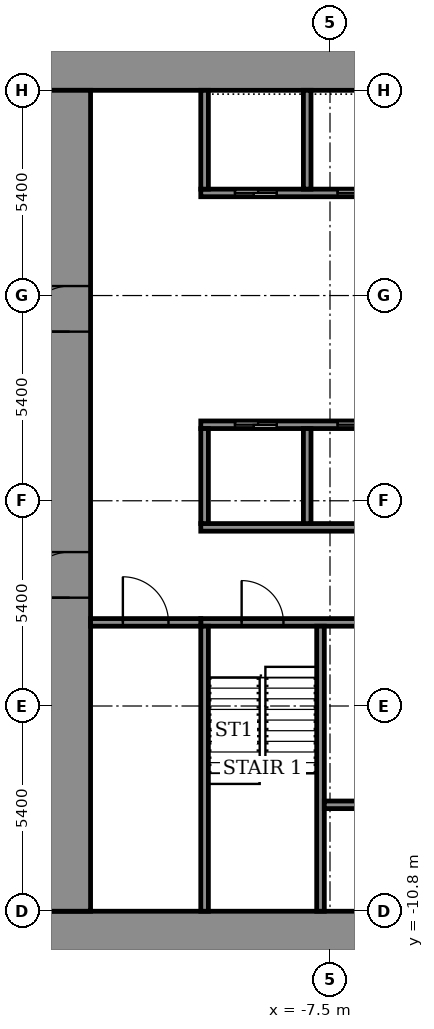
"""IFC4 building model, lengths in metres.
Left out: names, types, materials, properties, quantities, classifications, styles, units other than length and angle.
Written with IfcOpenShell. Run it as: python <this file> out.ifc"""

import sys

from ifc_helpers import new_model, si_unit, direction, frame, frame_2d, origin, place, context, subcontext, project, spatial, rectangle, extrude, element, fill, save


model = new_model("IFC4")
c1 = context("Model", 3, precision=1e-05, world=origin(), true_north=direction((0.0, 1.0)))
c2 = subcontext(c1, "Body", "Model", "MODEL_VIEW")
j1 = project(units=[si_unit("LENGTHUNIT", "METRE"), si_unit("PLANEANGLEUNIT", "RADIAN")], contexts=[c1])
p1 = place(None, origin())
s1 = spatial("IfcSite", under=j1, at=p1, CompositionType="ELEMENT")
p2 = place(p1, origin())
s2 = spatial("IfcBuilding", under=s1, at=p2, CompositionType="ELEMENT")
p3 = place(p2, frame((0.0, 0.0, 41.3)))
s3 = spatial("IfcBuildingStorey", under=s2, at=p3, CompositionType="ELEMENT", Elevation=41.3)
for number, where, z_axis, x_axis in (
    (1, (-14.9, -11.35, 0.0), (0.0, 0.0, 1.0), (1.0, 0.0, 0.0)),
    (2, (-14.9, 11.35, 0.0), (0.0, 0.0, 1.0), (1.0, 0.0, 0.0)),
):
    element("IfcWall", number, at=place(p3, frame(where, z_axis=z_axis, x_axis=x_axis)), inside=s3, PredefinedType="SHEAR", context=c2, shape_type="SweptSolid", body=[
        extrude(rectangle(XDim=29.8, YDim=1.1, at=frame_2d((14.9, 0.0))), origin(), (0.0, 0.0, 1.0), 3.6),
    ])
p4 = place(p3, frame((-14.35, -10.8, 0.0), z_axis=(0.0, 0.0, 1.0), x_axis=(0.0, 1.0, 0.0)))
e3 = element("IfcWall", 3, at=p4, inside=s3, PredefinedType="SHEAR", context=c2, shape_type="SweptSolid", body=[
    extrude(rectangle(XDim=21.6, YDim=1.1, at=frame_2d((10.8, 0.0))), origin(), (0.0, 0.0, 1.0), 3.6),
])
p5 = place(p4, frame((8.25, 0.0, 0.0)))
e4 = element("IfcOpeningElement", 4, at=p5, cuts=e3, PredefinedType="OPENING", context=c2, shape_type="SweptSolid", body=[
    extrude(rectangle(XDim=1.2, YDim=2.1, at=frame_2d((0.6, 1.05))), frame((0.0, 0.56, 0.0), z_axis=(0.0, -1.0, 0.0), x_axis=(1.0, 0.0, 0.0)), (0.0, 0.0, 1.0), 1.12),
])
p6 = place(p4, frame((15.25, 0.0, 0.0)))
e5 = element("IfcOpeningElement", 5, at=p6, cuts=e3, PredefinedType="OPENING", context=c2, shape_type="SweptSolid", body=[
    extrude(rectangle(XDim=1.2, YDim=2.1, at=frame_2d((0.6, 1.05))), frame((0.0, 0.56, 0.0), z_axis=(0.0, -1.0, 0.0), x_axis=(1.0, 0.0, 0.0)), (0.0, 0.0, 1.0), 1.12),
])
p7 = place(p3, frame((-10.9, -3.2, 0.0), z_axis=(0.0, 0.0, 1.0), x_axis=(1.0, 0.0, 0.0)))
e6 = element("IfcWall", 6, at=p7, inside=s3, PredefinedType="SHEAR", context=c2, shape_type="SweptSolid", body=[
    extrude(rectangle(XDim=21.8, YDim=0.2, at=frame_2d((10.9, 0.0))), origin(), (0.0, 0.0, 1.0), 3.05),
])
p8 = place(p7, frame((1.075, 0.0, 0.0)))
e7 = element("IfcOpeningElement", 7, at=p8, cuts=e6, PredefinedType="OPENING", context=c2, shape_type="SweptSolid", body=[
    extrude(rectangle(XDim=1.1, YDim=2.1, at=frame_2d((0.55, 1.05))), frame((0.0, 0.11, 0.0), z_axis=(0.0, -1.0, 0.0), x_axis=(1.0, 0.0, 0.0)), (0.0, 0.0, 1.0), 0.22),
])
p9 = place(p7, frame((10.325, 0.0, 0.0)))
e8 = element("IfcOpeningElement", 8, at=p9, cuts=e6, PredefinedType="OPENING", context=c2, shape_type="SweptSolid", body=[
    extrude(rectangle(XDim=1.1, YDim=2.1, at=frame_2d((0.55, 1.05))), frame((0.0, 0.11, 0.0), z_axis=(0.0, -1.0, 0.0), x_axis=(1.0, 0.0, 0.0)), (0.0, 0.0, 1.0), 0.22),
])
p10 = place(p7, frame((19.625, 0.0, 0.0)))
e9 = element("IfcOpeningElement", 9, at=p10, cuts=e6, PredefinedType="OPENING", context=c2, shape_type="SweptSolid", body=[
    extrude(rectangle(XDim=1.1, YDim=2.1, at=frame_2d((0.55, 1.05))), frame((0.0, 0.11, 0.0), z_axis=(0.0, -1.0, 0.0), x_axis=(1.0, 0.0, 0.0)), (0.0, 0.0, 1.0), 0.22),
])
p11 = place(p7, frame((5.7, 0.0, 0.0)))
e10 = element("IfcOpeningElement", 10, at=p11, cuts=e6, PredefinedType="OPENING", context=c2, shape_type="SweptSolid", body=[
    extrude(rectangle(XDim=1.1, YDim=2.1, at=frame_2d((0.55, 1.05))), frame((0.0, 0.11, 0.0), z_axis=(0.0, -1.0, 0.0), x_axis=(1.0, 0.0, 0.0)), (0.0, 0.0, 1.0), 0.22),
])
p12 = place(p7, frame((14.975, 0.0, 0.0)))
e11 = element("IfcOpeningElement", 11, at=p12, cuts=e6, PredefinedType="OPENING", context=c2, shape_type="SweptSolid", body=[
    extrude(rectangle(XDim=1.1, YDim=2.1, at=frame_2d((0.55, 1.05))), frame((0.0, 0.11, 0.0), z_axis=(0.0, -1.0, 0.0), x_axis=(1.0, 0.0, 0.0)), (0.0, 0.0, 1.0), 0.22),
])
p13 = place(p3, frame((-10.9, -0.7, 0.0), z_axis=(0.0, 0.0, 1.0), x_axis=(1.0, 0.0, 0.0)))
e12 = element("IfcWall", 12, at=p13, inside=s3, PredefinedType="SHEAR", context=c2, shape_type="SweptSolid", body=[
    extrude(rectangle(XDim=21.8, YDim=0.2, at=frame_2d((10.9, 0.0))), origin(), (0.0, 0.0, 1.0), 3.05),
])
p14 = place(p3, frame((-10.9, 2.0, 0.0), z_axis=(0.0, 0.0, 1.0), x_axis=(1.0, 0.0, 0.0)))
e13 = element("IfcWall", 13, at=p14, inside=s3, PredefinedType="SHEAR", context=c2, shape_type="SweptSolid", body=[
    extrude(rectangle(XDim=21.8, YDim=0.2, at=frame_2d((10.9, 0.0))), origin(), (0.0, 0.0, 1.0), 3.05),
])
p15 = place(p14, frame((0.9, 0.0, 0.0)))
e14 = element("IfcOpeningElement", 14, at=p15, cuts=e13, PredefinedType="OPENING", context=c2, shape_type="SweptSolid", body=[
    extrude(rectangle(XDim=1.1, YDim=2.1, at=frame_2d((0.55, 1.05))), frame((0.0, 0.11, 0.0), z_axis=(0.0, -1.0, 0.0), x_axis=(1.0, 0.0, 0.0)), (0.0, 0.0, 1.0), 0.22),
])
p16 = place(p14, frame((3.6, 0.0, 0.0)))
e15 = element("IfcOpeningElement", 15, at=p16, cuts=e13, PredefinedType="OPENING", context=c2, shape_type="SweptSolid", body=[
    extrude(rectangle(XDim=1.1, YDim=2.1, at=frame_2d((0.55, 1.05))), frame((0.0, 0.11, 0.0), z_axis=(0.0, -1.0, 0.0), x_axis=(1.0, 0.0, 0.0)), (0.0, 0.0, 1.0), 0.22),
])
p17 = place(p14, frame((6.3, 0.0, 0.0)))
e16 = element("IfcOpeningElement", 16, at=p17, cuts=e13, PredefinedType="OPENING", context=c2, shape_type="SweptSolid", body=[
    extrude(rectangle(XDim=1.1, YDim=2.1, at=frame_2d((0.55, 1.05))), frame((0.0, 0.11, 0.0), z_axis=(0.0, -1.0, 0.0), x_axis=(1.0, 0.0, 0.0)), (0.0, 0.0, 1.0), 0.22),
])
p18 = place(p14, frame((9.0, 0.0, 0.0)))
e17 = element("IfcOpeningElement", 17, at=p18, cuts=e13, PredefinedType="OPENING", context=c2, shape_type="SweptSolid", body=[
    extrude(rectangle(XDim=1.1, YDim=2.1, at=frame_2d((0.55, 1.05))), frame((0.0, 0.11, 0.0), z_axis=(0.0, -1.0, 0.0), x_axis=(1.0, 0.0, 0.0)), (0.0, 0.0, 1.0), 0.22),
])
p19 = place(p14, frame((11.7, 0.0, 0.0)))
e18 = element("IfcOpeningElement", 18, at=p19, cuts=e13, PredefinedType="OPENING", context=c2, shape_type="SweptSolid", body=[
    extrude(rectangle(XDim=1.1, YDim=2.1, at=frame_2d((0.55, 1.05))), frame((0.0, 0.11, 0.0), z_axis=(0.0, -1.0, 0.0), x_axis=(1.0, 0.0, 0.0)), (0.0, 0.0, 1.0), 0.22),
])
p20 = place(p14, frame((15.85, 0.0, 0.0)))
e19 = element("IfcOpeningElement", 19, at=p20, cuts=e13, PredefinedType="OPENING", context=c2, shape_type="SweptSolid", body=[
    extrude(rectangle(XDim=0.9, YDim=2.1, at=frame_2d((0.45, 1.05))), frame((0.0, 0.11, 0.0), z_axis=(0.0, -1.0, 0.0), x_axis=(1.0, 0.0, 0.0)), (0.0, 0.0, 1.0), 0.22),
])
p21 = place(p14, frame((19.9, 0.0, 0.0)))
e20 = element("IfcOpeningElement", 20, at=p21, cuts=e13, PredefinedType="OPENING", context=c2, shape_type="SweptSolid", body=[
    extrude(rectangle(XDim=0.9, YDim=2.1, at=frame_2d((0.45, 1.05))), frame((0.0, 0.11, 0.0), z_axis=(0.0, -1.0, 0.0), x_axis=(1.0, 0.0, 0.0)), (0.0, 0.0, 1.0), 0.22),
])
p22 = place(p3, frame((-10.9, 8.1, 0.0), z_axis=(0.0, 0.0, 1.0), x_axis=(1.0, 0.0, 0.0)))
e21 = element("IfcWall", 21, at=p22, inside=s3, PredefinedType="SHEAR", context=c2, shape_type="SweptSolid", body=[
    extrude(rectangle(XDim=21.8, YDim=0.2, at=frame_2d((10.9, 0.0))), origin(), (0.0, 0.0, 1.0), 3.05),
])
p23 = place(p22, frame((0.9, 0.0, 0.0)))
e22 = element("IfcOpeningElement", 22, at=p23, cuts=e21, PredefinedType="OPENING", context=c2, shape_type="SweptSolid", body=[
    extrude(rectangle(XDim=1.1, YDim=2.1, at=frame_2d((0.55, 1.05))), frame((0.0, 0.11, 0.0), z_axis=(0.0, -1.0, 0.0), x_axis=(1.0, 0.0, 0.0)), (0.0, 0.0, 1.0), 0.22),
])
p24 = place(p22, frame((3.6, 0.0, 0.0)))
e23 = element("IfcOpeningElement", 23, at=p24, cuts=e21, PredefinedType="OPENING", context=c2, shape_type="SweptSolid", body=[
    extrude(rectangle(XDim=1.1, YDim=2.1, at=frame_2d((0.55, 1.05))), frame((0.0, 0.11, 0.0), z_axis=(0.0, -1.0, 0.0), x_axis=(1.0, 0.0, 0.0)), (0.0, 0.0, 1.0), 0.22),
])
p25 = place(p22, frame((6.3, 0.0, 0.0)))
e24 = element("IfcOpeningElement", 24, at=p25, cuts=e21, PredefinedType="OPENING", context=c2, shape_type="SweptSolid", body=[
    extrude(rectangle(XDim=1.1, YDim=2.1, at=frame_2d((0.55, 1.05))), frame((0.0, 0.11, 0.0), z_axis=(0.0, -1.0, 0.0), x_axis=(1.0, 0.0, 0.0)), (0.0, 0.0, 1.0), 0.22),
])
p26 = place(p22, frame((9.0, 0.0, 0.0)))
e25 = element("IfcOpeningElement", 25, at=p26, cuts=e21, PredefinedType="OPENING", context=c2, shape_type="SweptSolid", body=[
    extrude(rectangle(XDim=1.1, YDim=2.1, at=frame_2d((0.55, 1.05))), frame((0.0, 0.11, 0.0), z_axis=(0.0, -1.0, 0.0), x_axis=(1.0, 0.0, 0.0)), (0.0, 0.0, 1.0), 0.22),
])
p27 = place(p22, frame((11.7, 0.0, 0.0)))
e26 = element("IfcOpeningElement", 26, at=p27, cuts=e21, PredefinedType="OPENING", context=c2, shape_type="SweptSolid", body=[
    extrude(rectangle(XDim=1.1, YDim=2.1, at=frame_2d((0.55, 1.05))), frame((0.0, 0.11, 0.0), z_axis=(0.0, -1.0, 0.0), x_axis=(1.0, 0.0, 0.0)), (0.0, 0.0, 1.0), 0.22),
])
p28 = place(p22, frame((17.2, 0.0, 0.0)))
e27 = element("IfcOpeningElement", 27, at=p28, cuts=e21, PredefinedType="OPENING", context=c2, shape_type="SweptSolid", body=[
    extrude(rectangle(XDim=0.9, YDim=2.1, at=frame_2d((0.45, 1.05))), frame((0.0, 0.11, 0.0), z_axis=(0.0, -1.0, 0.0), x_axis=(1.0, 0.0, 0.0)), (0.0, 0.0, 1.0), 0.22),
])
for number, where, z_axis, x_axis in (
    (28, (-10.8, -10.8, 0.0), (0.0, 0.0, 1.0), (0.0, 1.0, 0.0)),
    (29, (-7.75, -10.8, 0.0), (0.0, 0.0, 1.0), (0.0, 1.0, 0.0)),
):
    element("IfcWall", number, at=place(p3, frame(where, z_axis=z_axis, x_axis=x_axis)), inside=s3, PredefinedType="SHEAR", context=c2, shape_type="SweptSolid", body=[
        extrude(rectangle(XDim=7.5, YDim=0.2, at=frame_2d((3.75, 0.0))), origin(), (0.0, 0.0, 1.0), 3.05),
    ])
p29 = place(p3, frame((-7.65, -8.0, 0.0), z_axis=(0.0, 0.0, 1.0), x_axis=(1.0, 0.0, 0.0)))
e30 = element("IfcWall", 30, at=p29, inside=s3, PredefinedType="SHEAR", context=c2, shape_type="SweptSolid", body=[
    extrude(rectangle(XDim=6.0, YDim=0.2, at=frame_2d((3.0, 0.0))), origin(), (0.0, 0.0, 1.0), 3.05),
])
p30 = place(p29, frame((0.9, 0.0, 0.0)))
e31 = element("IfcOpeningElement", 31, at=p30, cuts=e30, PredefinedType="OPENING", context=c2, shape_type="SweptSolid", body=[
    extrude(rectangle(XDim=1.1, YDim=2.1, at=frame_2d((0.55, 1.05))), frame((0.0, 0.11, 0.0), z_axis=(0.0, -1.0, 0.0), x_axis=(1.0, 0.0, 0.0)), (0.0, 0.0, 1.0), 0.22),
])
p31 = place(p29, frame((4.0, 0.0, 0.0)))
e32 = element("IfcOpeningElement", 32, at=p31, cuts=e30, PredefinedType="OPENING", context=c2, shape_type="SweptSolid", body=[
    extrude(rectangle(XDim=1.1, YDim=2.1, at=frame_2d((0.55, 1.05))), frame((0.0, 0.11, 0.0), z_axis=(0.0, -1.0, 0.0), x_axis=(1.0, 0.0, 0.0)), (0.0, 0.0, 1.0), 0.22),
])
for number, where, z_axis, x_axis in (
    (33, (-10.8, -0.6, 0.0), (0.0, 0.0, 1.0), (0.0, 1.0, 0.0)),
    (34, (-8.1, -0.6, 0.0), (0.0, 0.0, 1.0), (0.0, 1.0, 0.0)),
):
    element("IfcWall", number, at=place(p3, frame(where, z_axis=z_axis, x_axis=x_axis)), inside=s3, PredefinedType="SHEAR", context=c2, shape_type="SweptSolid", body=[
        extrude(rectangle(XDim=2.5, YDim=0.2, at=frame_2d((1.25, 0.0))), origin(), (0.0, 0.0, 1.0), 3.05),
    ])
for number, where, z_axis, x_axis in (
    (35, (-10.8, 8.2, 0.0), (0.0, 0.0, 1.0), (0.0, 1.0, 0.0)),
    (36, (-8.1, 8.2, 0.0), (0.0, 0.0, 1.0), (0.0, 1.0, 0.0)),
):
    element("IfcWall", number, at=place(p3, frame(where, z_axis=z_axis, x_axis=x_axis)), inside=s3, PredefinedType="SHEAR", context=c2, shape_type="SweptSolid", body=[
        extrude(rectangle(XDim=2.6, YDim=0.2, at=frame_2d((1.3, 0.0))), origin(), (0.0, 0.0, 1.0), 3.05),
    ])
p32 = place(p3, frame((-13.8, -3.2, 0.0), z_axis=(0.0, 0.0, 1.0), x_axis=(1.0, 0.0, 0.0)))
e37 = element("IfcWall", 37, at=p32, inside=s3, PredefinedType="STANDARD", context=c2, shape_type="SweptSolid", body=[
    extrude(rectangle(XDim=2.9, YDim=0.2, at=frame_2d((1.45, 0.0))), origin(), (0.0, 0.0, 1.0), 3.05),
])
p33 = place(p32, frame((0.85, 0.0, 0.0)))
e38 = element("IfcOpeningElement", 38, at=p33, cuts=e37, PredefinedType="OPENING", context=c2, shape_type="SweptSolid", body=[
    extrude(rectangle(XDim=1.2, YDim=2.1, at=frame_2d((0.6, 1.05))), frame((0.0, 0.11, 0.0), z_axis=(0.0, -1.0, 0.0), x_axis=(1.0, 0.0, 0.0)), (0.0, 0.0, 1.0), 0.22),
])
p34 = place(p5, origin())
e39 = element("IfcDoor", 39, at=p34, inside=s3, OperationType="DOUBLE_DOOR_SINGLE_SWING", PredefinedType="DOOR", context=c2, shape_type="SweptSolid", body=[
    extrude(rectangle(XDim=1.2, YDim=2.1, at=frame_2d((0.6, 1.05))), frame((0.0, 0.025, 0.0), z_axis=(0.0, -1.0, 0.0), x_axis=(1.0, 0.0, 0.0)), (0.0, 0.0, 1.0), 0.05),
])
fill(e4, e39)
p35 = place(p6, origin())
e40 = element("IfcDoor", 40, at=p35, inside=s3, OperationType="DOUBLE_DOOR_SINGLE_SWING", PredefinedType="DOOR", context=c2, shape_type="SweptSolid", body=[
    extrude(rectangle(XDim=1.2, YDim=2.1, at=frame_2d((0.6, 1.05))), frame((0.0, 0.025, 0.0), z_axis=(0.0, -1.0, 0.0), x_axis=(1.0, 0.0, 0.0)), (0.0, 0.0, 1.0), 0.05),
])
fill(e5, e40)
p36 = place(p15, origin())
e41 = element("IfcDoor", 41, at=p36, inside=s3, OperationType="SLIDING_TO_LEFT", PredefinedType="DOOR", context=c2, shape_type="SweptSolid", body=[
    extrude(rectangle(XDim=1.1, YDim=2.1, at=frame_2d((0.55, 1.05))), frame((0.0, 0.025, 0.0), z_axis=(0.0, -1.0, 0.0), x_axis=(1.0, 0.0, 0.0)), (0.0, 0.0, 1.0), 0.05),
])
fill(e14, e41)
p37 = place(p16, origin())
e42 = element("IfcDoor", 42, at=p37, inside=s3, OperationType="SLIDING_TO_LEFT", PredefinedType="DOOR", context=c2, shape_type="SweptSolid", body=[
    extrude(rectangle(XDim=1.1, YDim=2.1, at=frame_2d((0.55, 1.05))), frame((0.0, 0.025, 0.0), z_axis=(0.0, -1.0, 0.0), x_axis=(1.0, 0.0, 0.0)), (0.0, 0.0, 1.0), 0.05),
])
fill(e15, e42)
p38 = place(p23, origin())
e43 = element("IfcDoor", 43, at=p38, inside=s3, OperationType="SLIDING_TO_LEFT", PredefinedType="DOOR", context=c2, shape_type="SweptSolid", body=[
    extrude(rectangle(XDim=1.1, YDim=2.1, at=frame_2d((0.55, 1.05))), frame((0.0, 0.025, 0.0), z_axis=(0.0, -1.0, 0.0), x_axis=(1.0, 0.0, 0.0)), (0.0, 0.0, 1.0), 0.05),
])
fill(e22, e43)
p39 = place(p24, origin())
e44 = element("IfcDoor", 44, at=p39, inside=s3, OperationType="SLIDING_TO_LEFT", PredefinedType="DOOR", context=c2, shape_type="SweptSolid", body=[
    extrude(rectangle(XDim=1.1, YDim=2.1, at=frame_2d((0.55, 1.05))), frame((0.0, 0.025, 0.0), z_axis=(0.0, -1.0, 0.0), x_axis=(1.0, 0.0, 0.0)), (0.0, 0.0, 1.0), 0.05),
])
fill(e23, e44)
p40 = place(p8, origin())
e45 = element("IfcDoor", 45, at=p40, inside=s3, OperationType="SINGLE_SWING_RIGHT", PredefinedType="DOOR", context=c2, shape_type="SweptSolid", body=[
    extrude(rectangle(XDim=1.1, YDim=2.1, at=frame_2d((0.55, 1.05))), frame((0.0, 0.025, 0.0), z_axis=(0.0, -1.0, 0.0), x_axis=(1.0, 0.0, 0.0)), (0.0, 0.0, 1.0), 0.05),
])
fill(e7, e45)
p41 = place(p33, origin())
e46 = element("IfcDoor", 46, at=p41, inside=s3, OperationType="SINGLE_SWING_LEFT", PredefinedType="DOOR", context=c2, shape_type="SweptSolid", body=[
    extrude(rectangle(XDim=1.2, YDim=2.1, at=frame_2d((0.6, 1.05))), frame((0.0, 0.025, 0.0), z_axis=(0.0, -1.0, 0.0), x_axis=(1.0, 0.0, 0.0)), (0.0, 0.0, 1.0), 0.05),
])
fill(e38, e46)
save(model, sys.argv[1])
